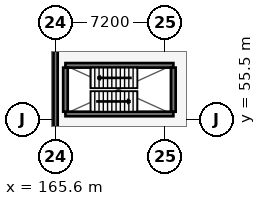
"""IFC4 building model, lengths in metres.
Left out: names, types, materials, properties, quantities, classifications, styles, units other than length and angle.
Written with IfcOpenShell. Run it as: python <this file> out.ifc"""

import sys

from ifc_helpers import new_model, si_unit, direction, frame, frame_2d, origin, place, context, subcontext, project, spatial, rectangle, extrude, element, fill, save


model = new_model("IFC4")
c1 = context("Model", 3, precision=1e-05, world=origin(), true_north=direction((0.0, 1.0)))
c2 = subcontext(c1, "Body", "Model", "MODEL_VIEW")
j1 = project(units=[si_unit("LENGTHUNIT", "METRE"), si_unit("PLANEANGLEUNIT", "RADIAN")], contexts=[c1])
p1 = place(None, origin())
s1 = spatial("IfcSite", under=j1, at=p1, CompositionType="ELEMENT")
p2 = place(p1, origin())
s2 = spatial("IfcBuilding", under=s1, at=p2, CompositionType="ELEMENT")
p3 = place(p2, frame((0.0, 0.0, 9.0)))
s3 = spatial("IfcBuildingStorey", under=s2, at=p3, CompositionType="ELEMENT", Elevation=9.0)
p4 = place(p3, frame((165.6, 86.4, 0.0), z_axis=(0.0, 0.0, 1.0), x_axis=(0.0, -1.0, 0.0)))
e1 = element("IfcWall", 1, at=p4, inside=s3, PredefinedType="SOLIDWALL", context=c2, shape_type="SweptSolid", body=[
    extrude(rectangle(XDim=43.2, YDim=0.28, at=frame_2d((21.6, 0.0))), origin(), (0.0, 0.0, 1.0), 3.4),
])
p5 = place(p4, frame((9.4, 0.0, 0.78)))
e2 = element("IfcOpeningElement", 2, at=p5, cuts=e1, PredefinedType="OPENING", context=c2, shape_type="SweptSolid", body=[
    extrude(rectangle(XDim=2.1, YDim=1.8, at=frame_2d((1.05, 0.9))), frame((0.0, 0.15, 0.0), z_axis=(0.0, -1.0, 0.0), x_axis=(1.0, 0.0, 0.0)), (0.0, 0.0, 1.0), 0.3),
])
p6 = place(p4, frame((16.6, 0.0, 0.78)))
e3 = element("IfcOpeningElement", 3, at=p6, cuts=e1, PredefinedType="OPENING", context=c2, shape_type="SweptSolid", body=[
    extrude(rectangle(XDim=1.1, YDim=1.65, at=frame_2d((0.55, 0.825))), frame((0.0, 0.15, 0.0), z_axis=(0.0, -1.0, 0.0), x_axis=(1.0, 0.0, 0.0)), (0.0, 0.0, 1.0), 0.3),
])
p7 = place(p4, frame((23.8, 0.0, 0.78)))
e4 = element("IfcOpeningElement", 4, at=p7, cuts=e1, PredefinedType="OPENING", context=c2, shape_type="SweptSolid", body=[
    extrude(rectangle(XDim=1.25, YDim=1.7, at=frame_2d((0.625, 0.85))), frame((0.0, 0.15, 0.0), z_axis=(0.0, -1.0, 0.0), x_axis=(1.0, 0.0, 0.0)), (0.0, 0.0, 1.0), 0.3),
])
for number, where, z_axis, x_axis in (
    (5, (166.25, 55.85, 0.0), (0.0, 0.0, 1.0), (1.0, 0.0, 0.0)),
    (6, (173.35, 59.05, 0.0), (0.0, 0.0, 1.0), (-1.0, 0.0, 0.0)),
):
    element("IfcWall", number, at=place(p3, frame(where, z_axis=z_axis, x_axis=x_axis)), inside=s3, PredefinedType="SHEAR", context=c2, shape_type="SweptSolid", body=[
        extrude(rectangle(XDim=7.1, YDim=0.3, at=frame_2d((3.55, 0.0))), origin(), (0.0, 0.0, 1.0), 3.925),
    ])
p8 = place(p3, frame((173.35, 56.0, 0.0), z_axis=(0.0, 0.0, 1.0), x_axis=(0.0, 1.0, 0.0)))
e7 = element("IfcWall", 7, at=p8, inside=s3, PredefinedType="SHEAR", context=c2, shape_type="SweptSolid", body=[
    extrude(rectangle(XDim=2.9, YDim=0.3, at=frame_2d((1.45, 0.0))), origin(), (0.0, 0.0, 1.0), 3.925),
])
p9 = place(p3, frame((166.25, 58.9, 0.0), z_axis=(0.0, 0.0, 1.0), x_axis=(0.0, -1.0, 0.0)))
e8 = element("IfcWall", 8, at=p9, inside=s3, PredefinedType="SHEAR", context=c2, shape_type="SweptSolid", body=[
    extrude(rectangle(XDim=2.9, YDim=0.3, at=frame_2d((1.45, 0.0))), origin(), (0.0, 0.0, 1.0), 3.925),
])
p10 = place(p9, frame((0.75, 0.0, 0.0)))
e9 = element("IfcOpeningElement", 9, at=p10, cuts=e8, PredefinedType="OPENING", context=c2, shape_type="SweptSolid", body=[
    extrude(rectangle(XDim=1.05, YDim=2.15, at=frame_2d((0.525, 1.075))), frame((0.0, 0.16, 0.0), z_axis=(0.0, -1.0, 0.0), x_axis=(1.0, 0.0, 0.0)), (0.0, 0.0, 1.0), 0.32),
])
p11 = place(p10, origin())
e10 = element("IfcDoor", 10, at=p11, inside=s3, OperationType="SINGLE_SWING_LEFT", PredefinedType="DOOR", context=c2, shape_type="SweptSolid", body=[
    extrude(rectangle(XDim=1.05, YDim=2.15, at=frame_2d((0.525, 1.075))), frame((0.0, 0.025, 0.0), z_axis=(0.0, -1.0, 0.0), x_axis=(1.0, 0.0, 0.0)), (0.0, 0.0, 1.0), 0.05),
])
fill(e9, e10)
save(model, sys.argv[1])
